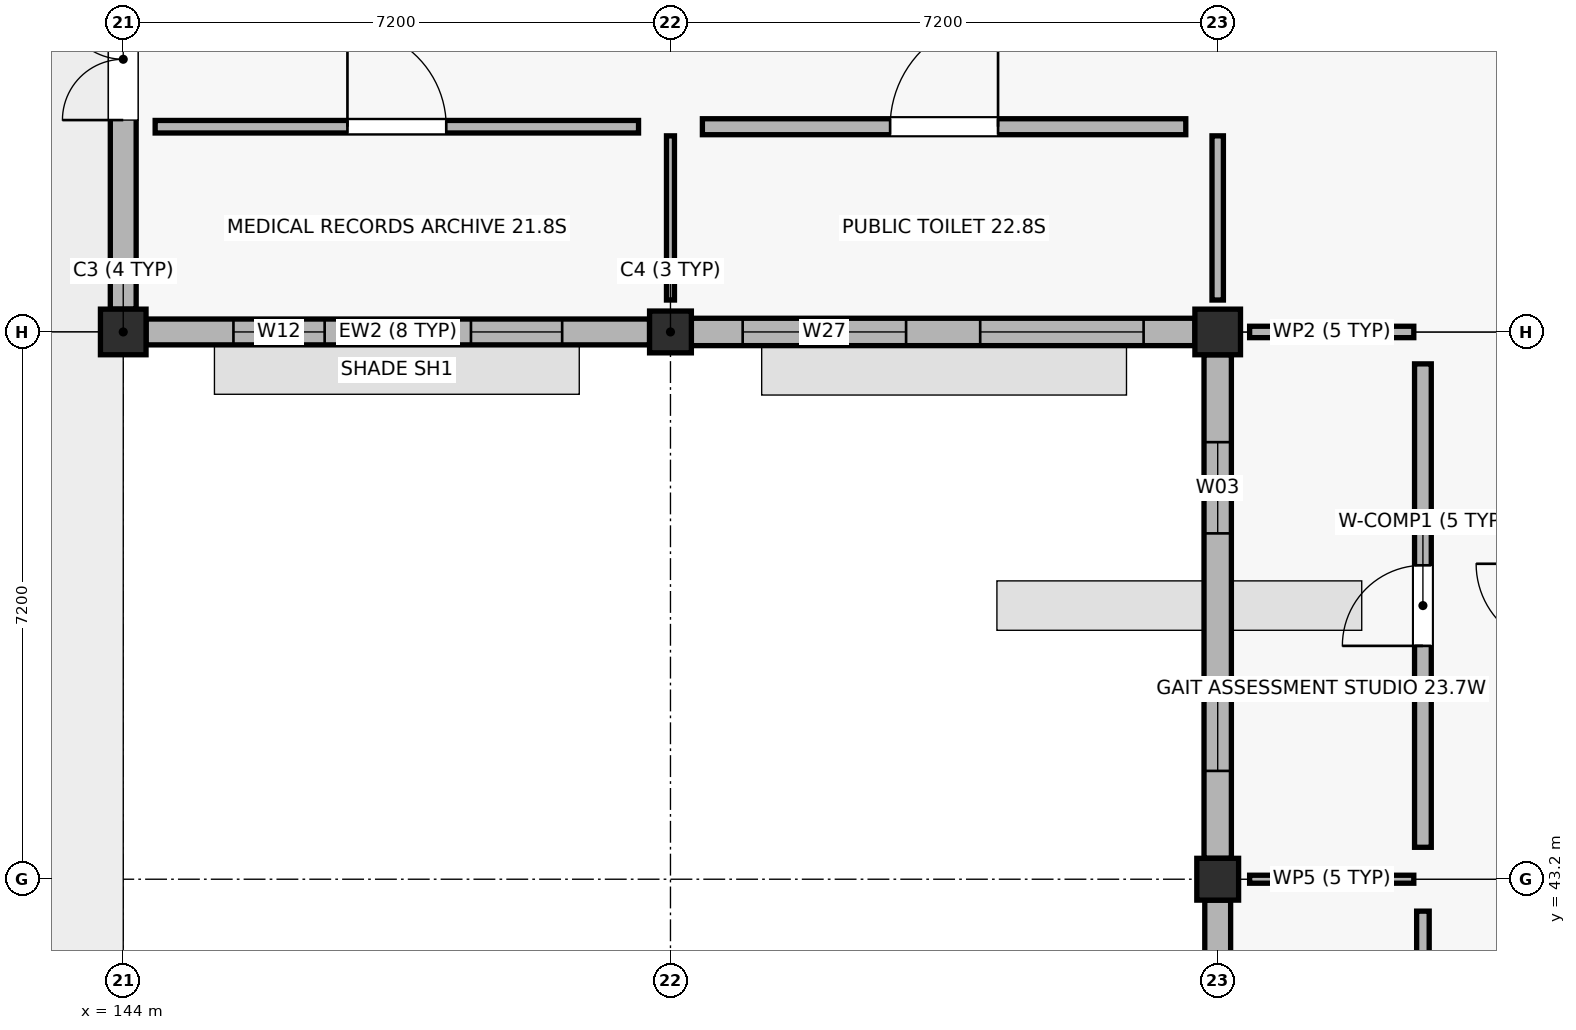
"""IFC4 building model, lengths in metres.
Left out: names, types, materials, properties, quantities, classifications, styles, units other than length and angle.
Written with IfcOpenShell. Run it as: python <this file> out.ifc"""

import sys

from ifc_helpers import new_model, si_unit, direction, frame, frame_2d, origin, origin_2d, place, context, subcontext, project, spatial, rectangle, extrude, element, fill, save


model = new_model("IFC4")
c1 = context("Model", 3, precision=1e-05, world=origin(), true_north=direction((0.0, 1.0)))
c2 = subcontext(c1, "Body", "Model", "MODEL_VIEW")
j1 = project(units=[si_unit("LENGTHUNIT", "METRE"), si_unit("PLANEANGLEUNIT", "RADIAN")], contexts=[c1])
p1 = place(None, origin())
s1 = spatial("IfcSite", under=j1, at=p1, CompositionType="ELEMENT")
p2 = place(p1, origin())
s2 = spatial("IfcBuilding", under=s1, at=p2, CompositionType="ELEMENT")
p3 = place(p2, origin())
s3 = spatial("IfcBuildingStorey", under=s2, at=p3, CompositionType="ELEMENT", Elevation=0.0)
p4 = place(p3, frame((144.0, 50.4, -0.25), z_axis=(0.0, 0.0, 1.0), x_axis=(1.0, 0.0, 0.0)))
e1 = element("IfcColumn", 1, at=p4, inside=s3, PredefinedType="COLUMN", context=c2, shape_type="SweptSolid", body=[
    extrude(rectangle(XDim=0.6, YDim=0.6, at=origin_2d()), origin(), (0.0, 0.0, 1.0), 4.75),
])
for number, where, z_axis, x_axis in (
    (2, (151.2, 50.4, -0.25), (0.0, 0.0, 1.0), (1.0, 0.0, 0.0)),
    (3, (158.4, 43.2, -0.25), (0.0, 0.0, 1.0), (1.0, 0.0, 0.0)),
):
    element("IfcColumn", number, at=place(p3, frame(where, z_axis=z_axis, x_axis=x_axis)), inside=s3, PredefinedType="COLUMN", context=c2, shape_type="SweptSolid", body=[
        extrude(rectangle(XDim=0.55, YDim=0.55, at=origin_2d()), origin(), (0.0, 0.0, 1.0), 4.75),
    ])
p5 = place(p3, frame((158.4, 50.4, -0.25), z_axis=(0.0, 0.0, 1.0), x_axis=(1.0, 0.0, 0.0)))
e4 = element("IfcColumn", 4, at=p5, inside=s3, PredefinedType="COLUMN", context=c2, shape_type="SweptSolid", body=[
    extrude(rectangle(XDim=0.6, YDim=0.6, at=origin_2d()), origin(), (0.0, 0.0, 1.0), 4.75),
])
p6 = place(p3, frame((144.3, 50.4, 0.0), z_axis=(0.0, 0.0, 1.0), x_axis=(1.0, 0.0, 0.0)))
e5 = element("IfcWall", 5, at=p6, inside=s3, PredefinedType="SOLIDWALL", context=c2, shape_type="SweptSolid", body=[
    extrude(rectangle(XDim=6.625, YDim=0.34, at=frame_2d((3.312, 0.0))), origin(), (0.0, 0.0, 1.0), 3.47),
])
p7 = place(p6, frame((1.15, 0.0, 0.9)))
e6 = element("IfcOpeningElement", 6, at=p7, cuts=e5, PredefinedType="OPENING", context=c2, shape_type="SweptSolid", body=[
    extrude(rectangle(XDim=1.2, YDim=1.38, at=frame_2d((0.6, 0.69))), frame((0.0, 0.18, 0.0), z_axis=(0.0, -1.0, 0.0), x_axis=(1.0, 0.0, 0.0)), (0.0, 0.0, 1.0), 0.36),
])
p8 = place(p6, frame((4.275, 0.0, 0.9)))
e7 = element("IfcOpeningElement", 7, at=p8, cuts=e5, PredefinedType="OPENING", context=c2, shape_type="SweptSolid", body=[
    extrude(rectangle(XDim=1.2, YDim=1.38, at=frame_2d((0.6, 0.69))), frame((0.0, 0.18, 0.0), z_axis=(0.0, -1.0, 0.0), x_axis=(1.0, 0.0, 0.0)), (0.0, 0.0, 1.0), 0.36),
])
p9 = place(p3, frame((144.0, 50.7, 0.0), z_axis=(0.0, 0.0, 1.0), x_axis=(0.0, 1.0, 0.0)))
e8 = element("IfcWall", 8, at=p9, inside=s3, PredefinedType="SOLIDWALL", context=c2, shape_type="SweptSolid", body=[
    extrude(rectangle(XDim=6.575, YDim=0.34, at=frame_2d((3.288, 0.0))), origin(), (0.0, 0.0, 1.0), 3.52),
])
p10 = place(p9, frame((2.488, 0.0, 0.0)))
e9 = element("IfcOpeningElement", 9, at=p10, cuts=e8, PredefinedType="OPENING", context=c2, shape_type="SweptSolid", body=[
    extrude(rectangle(XDim=1.6, YDim=2.25, at=frame_2d((0.8, 1.125))), frame((0.0, 0.18, 0.0), z_axis=(0.0, -1.0, 0.0), x_axis=(1.0, 0.0, 0.0)), (0.0, 0.0, 1.0), 0.36),
])
p11 = place(p3, frame((151.475, 50.4, 0.0), z_axis=(0.0, 0.0, 1.0), x_axis=(1.0, 0.0, 0.0)))
e10 = element("IfcWall", 10, at=p11, inside=s3, PredefinedType="SOLIDWALL", context=c2, shape_type="SweptSolid", body=[
    extrude(rectangle(XDim=6.625, YDim=0.36, at=frame_2d((3.312, 0.0))), origin(), (0.0, 0.0, 1.0), 3.47),
])
p12 = place(p11, frame((0.675, 0.0, 0.9)))
e11 = element("IfcOpeningElement", 11, at=p12, cuts=e10, PredefinedType="OPENING", context=c2, shape_type="SweptSolid", body=[
    extrude(rectangle(XDim=2.15, YDim=1.5, at=frame_2d((1.075, 0.75))), frame((0.0, 0.19, 0.0), z_axis=(0.0, -1.0, 0.0), x_axis=(1.0, 0.0, 0.0)), (0.0, 0.0, 1.0), 0.38),
])
p13 = place(p11, frame((3.8, 0.0, 0.9)))
e12 = element("IfcOpeningElement", 12, at=p13, cuts=e10, PredefinedType="OPENING", context=c2, shape_type="SweptSolid", body=[
    extrude(rectangle(XDim=2.15, YDim=1.5, at=frame_2d((1.075, 0.75))), frame((0.0, 0.19, 0.0), z_axis=(0.0, -1.0, 0.0), x_axis=(1.0, 0.0, 0.0)), (0.0, 0.0, 1.0), 0.38),
])
p14 = place(p3, frame((158.4, 42.925, 0.0), z_axis=(0.0, 0.0, 1.0), x_axis=(0.0, -1.0, 0.0)))
e13 = element("IfcWall", 13, at=p14, inside=s3, PredefinedType="SOLIDWALL", context=c2, shape_type="SweptSolid", body=[
    extrude(rectangle(XDim=6.65, YDim=0.34, at=frame_2d((3.325, 0.0))), origin(), (0.0, 0.0, 1.0), 3.52),
])
p15 = place(p14, frame((0.85, 0.0, 0.9)))
e14 = element("IfcOpeningElement", 14, at=p15, cuts=e13, PredefinedType="OPENING", context=c2, shape_type="SweptSolid", body=[
    extrude(rectangle(XDim=1.8, YDim=1.88, at=frame_2d((0.9, 0.94))), frame((0.0, 0.18, 0.0), z_axis=(0.0, -1.0, 0.0), x_axis=(1.0, 0.0, 0.0)), (0.0, 0.0, 1.0), 0.36),
])
p16 = place(p14, frame((4.0, 0.0, 0.9)))
e15 = element("IfcOpeningElement", 15, at=p16, cuts=e13, PredefinedType="OPENING", context=c2, shape_type="SweptSolid", body=[
    extrude(rectangle(XDim=1.8, YDim=1.88, at=frame_2d((0.9, 0.94))), frame((0.0, 0.18, 0.0), z_axis=(0.0, -1.0, 0.0), x_axis=(1.0, 0.0, 0.0)), (0.0, 0.0, 1.0), 0.36),
])
p17 = place(p3, frame((158.4, 50.1, 0.0), z_axis=(0.0, 0.0, 1.0), x_axis=(0.0, -1.0, 0.0)))
e16 = element("IfcWall", 16, at=p17, inside=s3, PredefinedType="SOLIDWALL", context=c2, shape_type="SweptSolid", body=[
    extrude(rectangle(XDim=6.625, YDim=0.36, at=frame_2d((3.312, 0.0))), origin(), (0.0, 0.0, 1.0), 3.52),
])
p18 = place(p17, frame((1.15, 0.0, 0.9)))
e17 = element("IfcOpeningElement", 17, at=p18, cuts=e16, PredefinedType="OPENING", context=c2, shape_type="SweptSolid", body=[
    extrude(rectangle(XDim=1.2, YDim=1.25, at=frame_2d((0.6, 0.625))), frame((0.0, 0.19, 0.0), z_axis=(0.0, -1.0, 0.0), x_axis=(1.0, 0.0, 0.0)), (0.0, 0.0, 1.0), 0.38),
])
p19 = place(p17, frame((4.275, 0.0, 0.9)))
e18 = element("IfcOpeningElement", 18, at=p19, cuts=e16, PredefinedType="OPENING", context=c2, shape_type="SweptSolid", body=[
    extrude(rectangle(XDim=1.2, YDim=1.25, at=frame_2d((0.6, 0.625))), frame((0.0, 0.19, 0.0), z_axis=(0.0, -1.0, 0.0), x_axis=(1.0, 0.0, 0.0)), (0.0, 0.0, 1.0), 0.38),
])
p20 = place(p3, frame((161.1, 36.42, 0.0), z_axis=(0.0, 0.0, 1.0), x_axis=(0.0, 1.0, 0.0)))
e19 = element("IfcWall", 19, at=p20, inside=s3, PredefinedType="PARTITIONING", context=c2, shape_type="SweptSolid", body=[
    extrude(rectangle(XDim=6.36, YDim=0.165, at=frame_2d((3.18, 0.0))), origin(), (0.0, 0.0, 1.0), 3.36),
])
p21 = place(p20, frame((2.69, 0.0, 0.0)))
e20 = element("IfcOpeningElement", 20, at=p21, cuts=e19, PredefinedType="OPENING", context=c2, shape_type="SweptSolid", body=[
    extrude(rectangle(XDim=0.98, YDim=2.04, at=frame_2d((0.49, 1.02))), frame((0.0, 0.093, 0.0), z_axis=(0.0, -1.0, 0.0), x_axis=(1.0, 0.0, 0.0)), (0.0, 0.0, 1.0), 0.185),
])
p22 = place(p3, frame((158.82, 43.2, 0.0), z_axis=(0.0, 0.0, 1.0), x_axis=(1.0, 0.0, 0.0)))
e21 = element("IfcWall", 21, at=p22, inside=s3, PredefinedType="PARTITIONING", context=c2, shape_type="SweptSolid", body=[
    extrude(rectangle(XDim=2.16, YDim=0.105, at=frame_2d((1.08, 0.0))), origin(), (0.0, 0.0, 1.0), 3.36),
])
p23 = place(p3, frame((161.1, 43.62, 0.0), z_axis=(0.0, 0.0, 1.0), x_axis=(0.0, 1.0, 0.0)))
e22 = element("IfcWall", 22, at=p23, inside=s3, PredefinedType="SOLIDWALL", context=c2, shape_type="SweptSolid", body=[
    extrude(rectangle(XDim=6.36, YDim=0.22, at=frame_2d((3.18, 0.0))), origin(), (0.0, 0.0, 1.0), 3.36),
])
p24 = place(p23, frame((2.65, 0.0, 0.0)))
e23 = element("IfcOpeningElement", 23, at=p24, cuts=e22, PredefinedType="OPENING", context=c2, shape_type="SweptSolid", body=[
    extrude(rectangle(XDim=1.06, YDim=2.04, at=frame_2d((0.53, 1.02))), frame((0.0, 0.12, 0.0), z_axis=(0.0, -1.0, 0.0), x_axis=(1.0, 0.0, 0.0)), (0.0, 0.0, 1.0), 0.24),
])
p25 = place(p3, frame((158.82, 50.4, 0.0), z_axis=(0.0, 0.0, 1.0), x_axis=(1.0, 0.0, 0.0)))
e24 = element("IfcWall", 24, at=p25, inside=s3, PredefinedType="PARTITIONING", context=c2, shape_type="SweptSolid", body=[
    extrude(rectangle(XDim=2.16, YDim=0.15, at=frame_2d((1.08, 0.0))), origin(), (0.0, 0.0, 1.0), 3.36),
])
p26 = place(p3, frame((144.42, 53.1, 0.0), z_axis=(0.0, 0.0, 1.0), x_axis=(1.0, 0.0, 0.0)))
e25 = element("IfcWall", 25, at=p26, inside=s3, PredefinedType="PARTITIONING", context=c2, shape_type="SweptSolid", body=[
    extrude(rectangle(XDim=6.36, YDim=0.165, at=frame_2d((3.18, 0.0))), origin(), (0.0, 0.0, 1.0), 3.36),
])
p27 = place(p26, frame((2.53, 0.0, 0.0)))
e26 = element("IfcOpeningElement", 26, at=p27, cuts=e25, PredefinedType="OPENING", context=c2, shape_type="SweptSolid", body=[
    extrude(rectangle(XDim=1.3, YDim=2.19, at=frame_2d((0.65, 1.095))), frame((0.0, 0.093, 0.0), z_axis=(0.0, -1.0, 0.0), x_axis=(1.0, 0.0, 0.0)), (0.0, 0.0, 1.0), 0.185),
])
p28 = place(p3, frame((151.2, 50.82, 0.0), z_axis=(0.0, 0.0, 1.0), x_axis=(0.0, 1.0, 0.0)))
e27 = element("IfcWall", 27, at=p28, inside=s3, PredefinedType="PARTITIONING", context=c2, shape_type="SweptSolid", body=[
    extrude(rectangle(XDim=2.16, YDim=0.105, at=frame_2d((1.08, 0.0))), origin(), (0.0, 0.0, 1.0), 3.36),
])
p29 = place(p3, frame((151.62, 53.1, 0.0), z_axis=(0.0, 0.0, 1.0), x_axis=(1.0, 0.0, 0.0)))
e28 = element("IfcWall", 28, at=p29, inside=s3, PredefinedType="PLUMBINGWALL", context=c2, shape_type="SweptSolid", body=[
    extrude(rectangle(XDim=6.36, YDim=0.21, at=frame_2d((3.18, 0.0))), origin(), (0.0, 0.0, 1.0), 3.36),
])
p30 = place(p29, frame((2.47, 0.0, 0.0)))
e29 = element("IfcOpeningElement", 29, at=p30, cuts=e28, PredefinedType="OPENING", context=c2, shape_type="SweptSolid", body=[
    extrude(rectangle(XDim=1.42, YDim=2.19, at=frame_2d((0.71, 1.095))), frame((0.0, 0.115, 0.0), z_axis=(0.0, -1.0, 0.0), x_axis=(1.0, 0.0, 0.0)), (0.0, 0.0, 1.0), 0.23),
])
p31 = place(p3, frame((158.4, 50.82, 0.0), z_axis=(0.0, 0.0, 1.0), x_axis=(0.0, 1.0, 0.0)))
e30 = element("IfcWall", 30, at=p31, inside=s3, PredefinedType="PARTITIONING", context=c2, shape_type="SweptSolid", body=[
    extrude(rectangle(XDim=2.16, YDim=0.15, at=frame_2d((1.08, 0.0))), origin(), (0.0, 0.0, 1.0), 3.36),
])
p32 = place(p7, origin())
e31 = element("IfcWindow", 31, at=p32, inside=s3, PartitioningType="SINGLE_PANEL", PredefinedType="WINDOW", context=c2, shape_type="SweptSolid", body=[
    extrude(rectangle(XDim=1.2, YDim=1.38, at=frame_2d((0.6, 0.69))), frame((0.0, 0.03, 0.0), z_axis=(0.0, -1.0, 0.0), x_axis=(1.0, 0.0, 0.0)), (0.0, 0.0, 1.0), 0.06),
])
fill(e6, e31)
p33 = place(p8, origin())
e32 = element("IfcWindow", 32, at=p33, inside=s3, PartitioningType="SINGLE_PANEL", PredefinedType="WINDOW", context=c2, shape_type="SweptSolid", body=[
    extrude(rectangle(XDim=1.2, YDim=1.38, at=frame_2d((0.6, 0.69))), frame((0.0, 0.03, 0.0), z_axis=(0.0, -1.0, 0.0), x_axis=(1.0, 0.0, 0.0)), (0.0, 0.0, 1.0), 0.06),
])
fill(e7, e32)
p34 = place(p10, origin())
e33 = element("IfcDoor", 33, at=p34, inside=s3, OperationType="DOUBLE_DOOR_SINGLE_SWING", PredefinedType="DOOR", context=c2, shape_type="SweptSolid", body=[
    extrude(rectangle(XDim=1.6, YDim=2.25, at=frame_2d((0.8, 1.125))), frame((0.0, 0.025, 0.0), z_axis=(0.0, -1.0, 0.0), x_axis=(1.0, 0.0, 0.0)), (0.0, 0.0, 1.0), 0.05),
])
fill(e9, e33)
p35 = place(p12, origin())
e34 = element("IfcWindow", 34, at=p35, inside=s3, PartitioningType="SINGLE_PANEL", PredefinedType="WINDOW", context=c2, shape_type="SweptSolid", body=[
    extrude(rectangle(XDim=2.15, YDim=1.5, at=frame_2d((1.075, 0.75))), frame((0.0, 0.03, 0.0), z_axis=(0.0, -1.0, 0.0), x_axis=(1.0, 0.0, 0.0)), (0.0, 0.0, 1.0), 0.06),
])
fill(e11, e34)
p36 = place(p13, origin())
e35 = element("IfcWindow", 35, at=p36, inside=s3, PartitioningType="SINGLE_PANEL", PredefinedType="WINDOW", context=c2, shape_type="SweptSolid", body=[
    extrude(rectangle(XDim=2.15, YDim=1.5, at=frame_2d((1.075, 0.75))), frame((0.0, 0.03, 0.0), z_axis=(0.0, -1.0, 0.0), x_axis=(1.0, 0.0, 0.0)), (0.0, 0.0, 1.0), 0.06),
])
fill(e12, e35)
p37 = place(p18, origin())
e36 = element("IfcWindow", 36, at=p37, inside=s3, PartitioningType="SINGLE_PANEL", PredefinedType="WINDOW", context=c2, shape_type="SweptSolid", body=[
    extrude(rectangle(XDim=1.2, YDim=1.25, at=frame_2d((0.6, 0.625))), frame((0.0, 0.03, 0.0), z_axis=(0.0, -1.0, 0.0), x_axis=(1.0, 0.0, 0.0)), (0.0, 0.0, 1.0), 0.06),
])
fill(e17, e36)
p38 = place(p19, origin())
e37 = element("IfcWindow", 37, at=p38, inside=s3, PartitioningType="SINGLE_PANEL", PredefinedType="WINDOW", context=c2, shape_type="SweptSolid", body=[
    extrude(rectangle(XDim=1.2, YDim=1.25, at=frame_2d((0.6, 0.625))), frame((0.0, 0.03, 0.0), z_axis=(0.0, -1.0, 0.0), x_axis=(1.0, 0.0, 0.0)), (0.0, 0.0, 1.0), 0.06),
])
fill(e18, e37)
p39 = place(p24, origin())
e38 = element("IfcDoor", 38, at=p39, inside=s3, OperationType="SINGLE_SWING_LEFT", PredefinedType="DOOR", context=c2, shape_type="SweptSolid", body=[
    extrude(rectangle(XDim=1.06, YDim=2.04, at=frame_2d((0.53, 1.02))), frame((0.0, 0.025, 0.0), z_axis=(0.0, -1.0, 0.0), x_axis=(1.0, 0.0, 0.0)), (0.0, 0.0, 1.0), 0.05),
])
fill(e23, e38)
p40 = place(p27, origin())
e39 = element("IfcDoor", 39, at=p40, inside=s3, OperationType="SINGLE_SWING_LEFT", PredefinedType="DOOR", context=c2, shape_type="SweptSolid", body=[
    extrude(rectangle(XDim=1.3, YDim=2.19, at=frame_2d((0.65, 1.095))), frame((0.0, 0.025, 0.0), z_axis=(0.0, -1.0, 0.0), x_axis=(1.0, 0.0, 0.0)), (0.0, 0.0, 1.0), 0.05),
])
fill(e26, e39)
p41 = place(p30, origin())
e40 = element("IfcDoor", 40, at=p41, inside=s3, OperationType="SINGLE_SWING_RIGHT", PredefinedType="DOOR", context=c2, shape_type="SweptSolid", body=[
    extrude(rectangle(XDim=1.42, YDim=2.19, at=frame_2d((0.71, 1.095))), frame((0.0, 0.025, 0.0), z_axis=(0.0, -1.0, 0.0), x_axis=(1.0, 0.0, 0.0)), (0.0, 0.0, 1.0), 0.05),
])
fill(e29, e40)
save(model, sys.argv[1])
